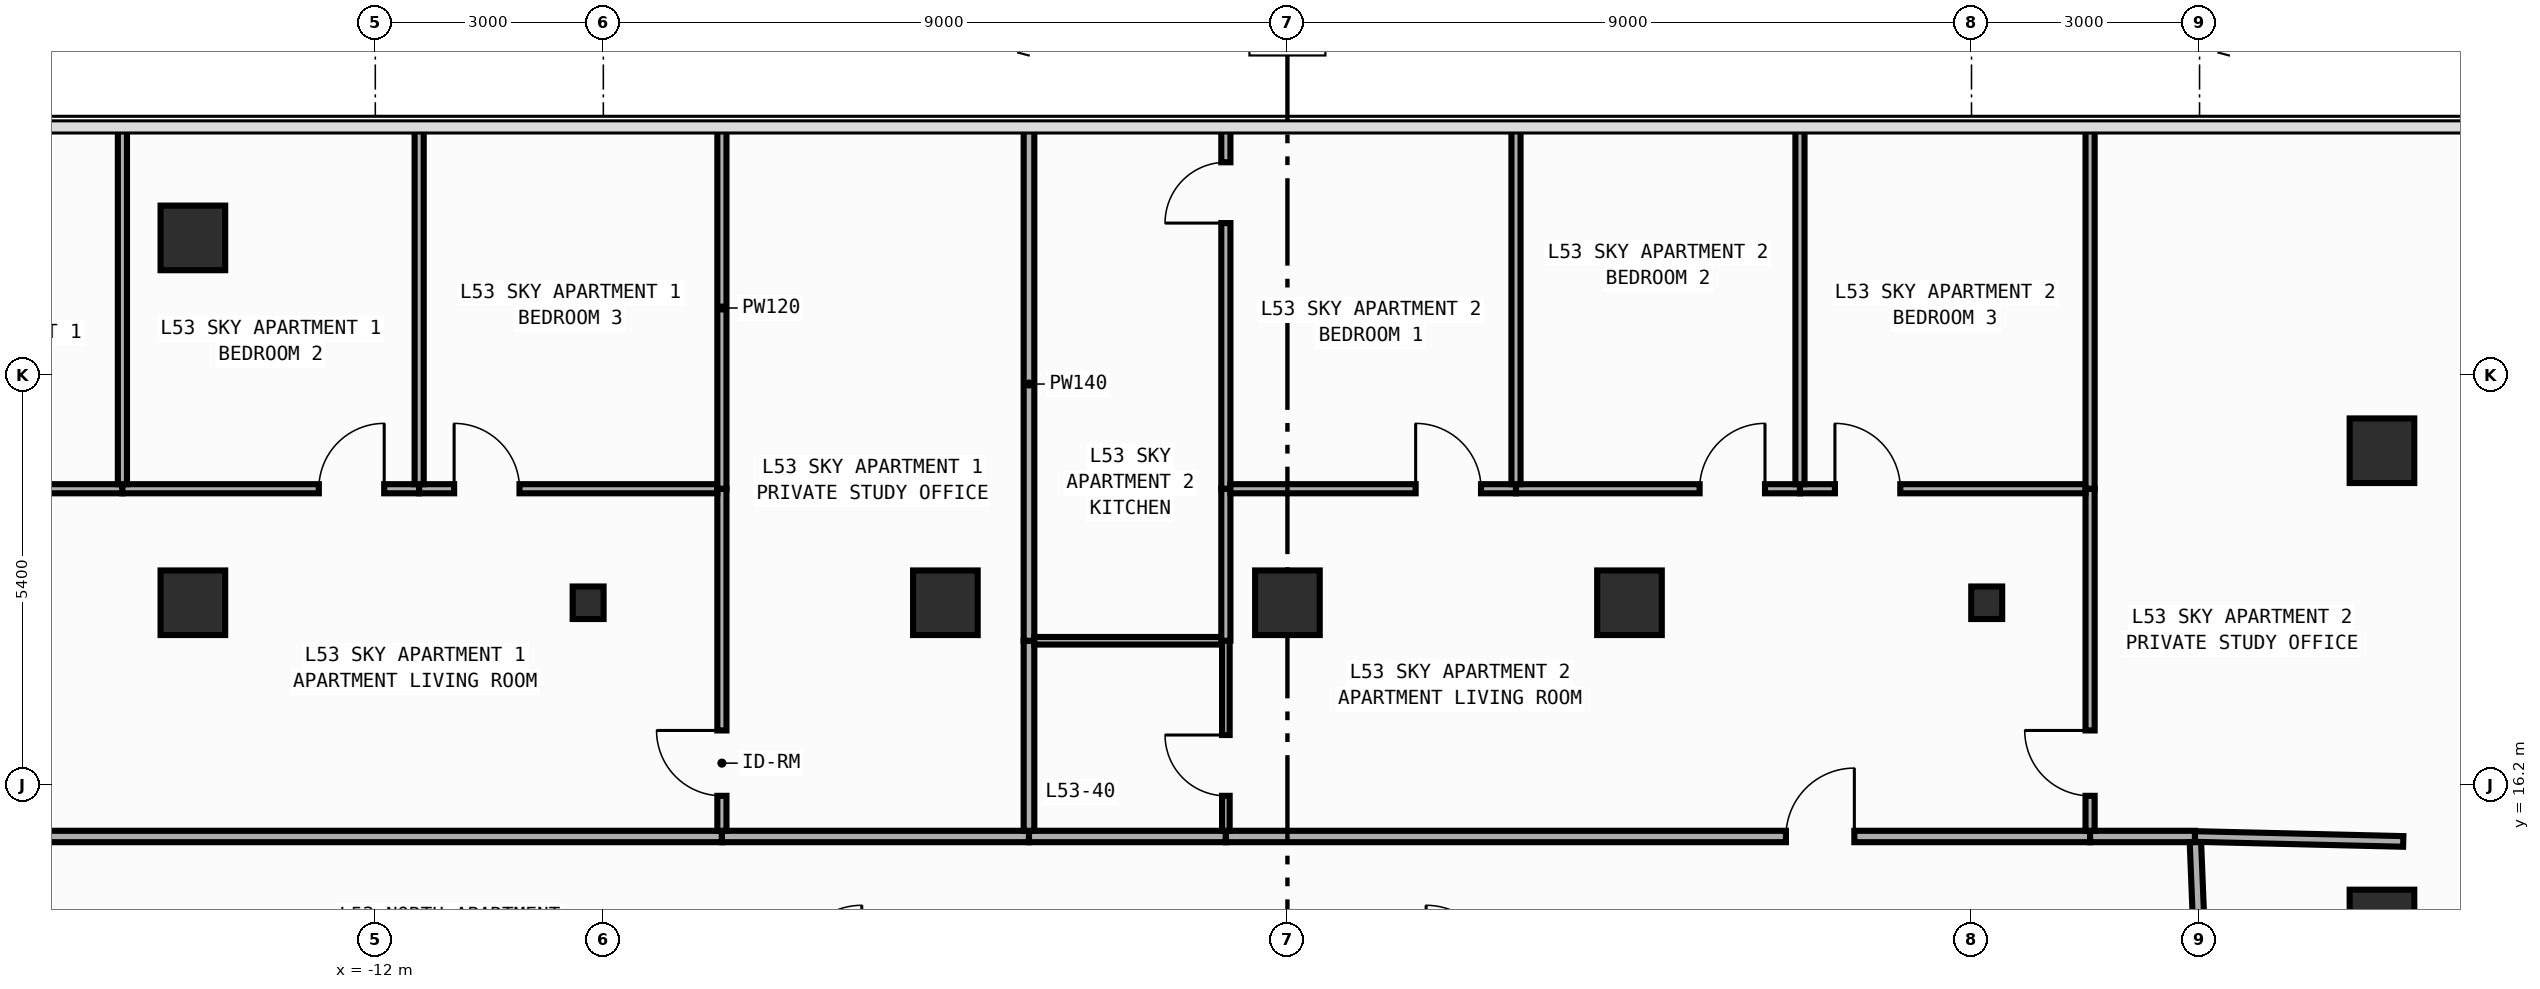
"""IFC4 building model, lengths in metres.
Left out: names, types, materials, properties, quantities, classifications, styles, units other than length and angle.
Written with IfcOpenShell. Run it as: python <this file> out.ifc"""

import sys

from ifc_helpers import new_model, si_unit, direction, frame, frame_2d, origin, origin_2d, place, context, subcontext, project, spatial, rectangle, i_section, extrude, element, fill, save


model = new_model("IFC4")
c1 = context("Model", 3, precision=1e-05, world=origin(), true_north=direction((0.0, 1.0)))
c2 = subcontext(c1, "Body", "Model", "MODEL_VIEW")
j1 = project(units=[si_unit("LENGTHUNIT", "METRE"), si_unit("PLANEANGLEUNIT", "RADIAN")], contexts=[c1])
p1 = place(None, origin())
s1 = spatial("IfcSite", under=j1, at=p1, CompositionType="ELEMENT")
p2 = place(p1, origin())
s2 = spatial("IfcBuilding", under=s1, at=p2, CompositionType="ELEMENT")
p3 = place(p2, frame((0.0, 0.0, 229.6)))
s3 = spatial("IfcBuildingStorey", under=s2, at=p3, CompositionType="ELEMENT", Elevation=229.6)
for number, where, z_axis, x_axis in (
    (1, (-9.2, 18.6, 0.0), (0.0, 0.0, 1.0), (1.0, 0.0, 0.0)),
    (2, (9.2, 18.6, 0.0), (0.0, 0.0, 1.0), (1.0, 0.0, 0.0)),
):
    element("IfcColumn", number, at=place(p3, frame(where, z_axis=z_axis, x_axis=x_axis)), inside=s3, PredefinedType="COLUMN", context=c2, shape_type="SweptSolid", body=[
        extrude(i_section(OverallWidth=0.407, OverallDepth=0.428, WebThickness=0.02, FlangeThickness=0.035, FilletRadius=0.022, at=origin_2d()), origin(), (0.0, 0.0, 1.0), 3.6),
    ])
for number, where, z_axis, x_axis in (
    (3, (-14.4, 18.6, 0.0), (0.0, 0.0, 1.0), (1.0, 0.0, 0.0)),
    (4, (14.4, 14.4, 0.0), (0.0, 0.0, 1.0), (1.0, 0.0, 0.0)),
    (5, (-4.5, 18.6, 0.0), (0.0, 0.0, 1.0), (1.0, 0.0, 0.0)),
    (6, (0.0, 18.6, 0.0), (0.0, 0.0, 1.0), (1.0, 0.0, 0.0)),
    (7, (4.5, 18.6, 0.0), (0.0, 0.0, 1.0), (1.0, 0.0, 0.0)),
    (8, (-14.4, 23.4, 0.0), (0.0, 0.0, 1.0), (1.0, 0.0, 0.0)),
    (9, (14.4, 20.6, 0.0), (0.0, 0.0, 1.0), (1.0, 0.0, 0.0)),
):
    element("IfcColumn", number, at=place(p3, frame(where, z_axis=z_axis, x_axis=x_axis)), inside=s3, PredefinedType="COLUMN", context=c2, shape_type="SweptSolid", body=[
        extrude(rectangle(XDim=0.85, YDim=0.85, at=origin_2d()), origin(), (0.0, 0.0, 1.0), 3.6),
    ])
p4 = place(p3, frame((-19.31, 15.525, 0.0), z_axis=(0.0, 0.0, 1.0), x_axis=(1.0, 0.0, 0.0)))
e10 = element("IfcWall", 10, at=p4, inside=s3, PredefinedType="PARTITIONING", context=c2, shape_type="SweptSolid", body=[
    extrude(rectangle(XDim=11.87, YDim=0.15, at=frame_2d((5.935, 0.0))), origin(), (0.0, 0.0, 1.0), 3.34),
])
p5 = place(p4, frame((1.465, 0.0, 0.0)))
e11 = element("IfcOpeningElement", 11, at=p5, cuts=e10, PredefinedType="OPENING", context=c2, shape_type="SweptSolid", body=[
    extrude(rectangle(XDim=0.9, YDim=2.15, at=frame_2d((0.45, 1.075))), frame((0.0, 0.085, 0.0), z_axis=(0.0, -1.0, 0.0), x_axis=(1.0, 0.0, 0.0)), (0.0, 0.0, 1.0), 0.17),
])
p6 = place(p3, frame((-7.44, 15.525, 0.0), z_axis=(0.0, 0.0, 1.0), x_axis=(1.0, 0.0, 0.0)))
e12 = element("IfcWall", 12, at=p6, inside=s3, PredefinedType="PARTITIONING", context=c2, shape_type="SweptSolid", body=[
    extrude(rectangle(XDim=4.04, YDim=0.15, at=frame_2d((2.02, 0.0))), origin(), (0.0, 0.0, 1.0), 3.34),
])
p7 = place(p3, frame((-3.4, 15.525, 0.0), z_axis=(0.0, 0.0, 1.0), x_axis=(1.0, 0.0, 0.0)))
e13 = element("IfcWall", 13, at=p7, inside=s3, PredefinedType="PARTITIONING", context=c2, shape_type="SweptSolid", body=[
    extrude(rectangle(XDim=2.59, YDim=0.15, at=frame_2d((1.295, 0.0))), origin(), (0.0, 0.0, 1.0), 3.34),
])
p8 = place(p3, frame((-0.81, 15.525, 0.0), z_axis=(0.0, 0.0, 1.0), x_axis=(1.0, 0.0, 0.0)))
e14 = element("IfcWall", 14, at=p8, inside=s3, PredefinedType="PARTITIONING", context=c2, shape_type="SweptSolid", body=[
    extrude(rectangle(XDim=11.37, YDim=0.15, at=frame_2d((5.685, 0.0))), origin(), (0.0, 0.0, 1.0), 3.34),
])
p9 = place(p8, frame((7.368, 0.0, 0.0)))
e15 = element("IfcOpeningElement", 15, at=p9, cuts=e14, PredefinedType="OPENING", context=c2, shape_type="SweptSolid", body=[
    extrude(rectangle(XDim=0.9, YDim=2.15, at=frame_2d((0.45, 1.075))), frame((0.0, 0.085, 0.0), z_axis=(0.0, -1.0, 0.0), x_axis=(1.0, 0.0, 0.0)), (0.0, 0.0, 1.0), 0.17),
])
p10 = place(p3, frame((10.56, 15.525, 0.0), z_axis=(0.0, 0.0, 1.0), x_axis=(1.0, 0.0, 0.0)))
e16 = element("IfcWall", 16, at=p10, inside=s3, PredefinedType="PARTITIONING", context=c2, shape_type="SweptSolid", body=[
    extrude(rectangle(XDim=1.38, YDim=0.15, at=frame_2d((0.69, 0.0))), origin(), (0.0, 0.0, 1.0), 3.34),
])
p11 = place(p3, frame((12.015, 13.72, 0.0), z_axis=(0.0, 0.0, 1.0), x_axis=(-0.040046877756, 0.99919780203, 0.0)))
e17 = element("IfcWall", 17, at=p11, inside=s3, PredefinedType="PARTITIONING", context=c2, shape_type="SweptSolid", body=[
    extrude(rectangle(XDim=1.731, YDim=0.15, at=frame_2d((0.866, 0.0))), origin(), (0.0, 0.0, 1.0), 3.34),
])
p12 = place(p3, frame((-7.44, 15.6, 0.0), z_axis=(0.0, 0.0, 1.0), x_axis=(0.0, 1.0, 0.0)))
e18 = element("IfcWall", 18, at=p12, inside=s3, PredefinedType="PARTITIONING", context=c2, shape_type="SweptSolid", body=[
    extrude(rectangle(XDim=4.5, YDim=0.12, at=frame_2d((2.25, 0.0))), origin(), (0.0, 0.0, 1.0), 3.34),
])
p13 = place(p12, frame((0.46, 0.0, 0.0)))
e19 = element("IfcOpeningElement", 19, at=p13, cuts=e18, PredefinedType="OPENING", context=c2, shape_type="SweptSolid", body=[
    extrude(rectangle(XDim=0.86, YDim=2.15, at=frame_2d((0.43, 1.075))), frame((0.0, 0.07, 0.0), z_axis=(0.0, -1.0, 0.0), x_axis=(1.0, 0.0, 0.0)), (0.0, 0.0, 1.0), 0.14),
])
p14 = place(p3, frame((-19.25, 20.1, 0.0), z_axis=(0.0, 0.0, 1.0), x_axis=(1.0, 0.0, 0.0)))
e20 = element("IfcWall", 20, at=p14, inside=s3, PredefinedType="PARTITIONING", context=c2, shape_type="SweptSolid", body=[
    extrude(rectangle(XDim=3.923, YDim=0.12, at=frame_2d((1.961, 0.0))), origin(), (0.0, 0.0, 1.0), 3.34),
])
p15 = place(p14, frame((1.317, 0.0, 0.0)))
e21 = element("IfcOpeningElement", 21, at=p15, cuts=e20, PredefinedType="OPENING", context=c2, shape_type="SweptSolid", body=[
    extrude(rectangle(XDim=0.86, YDim=2.15, at=frame_2d((0.43, 1.075))), frame((0.0, 0.07, 0.0), z_axis=(0.0, -1.0, 0.0), x_axis=(1.0, 0.0, 0.0)), (0.0, 0.0, 1.0), 0.14),
])
p16 = place(p3, frame((-15.327, 20.1, 0.0), z_axis=(0.0, 0.0, 1.0), x_axis=(1.0, 0.0, 0.0)))
e22 = element("IfcWall", 22, at=p16, inside=s3, PredefinedType="PARTITIONING", context=c2, shape_type="SweptSolid", body=[
    extrude(rectangle(XDim=3.904, YDim=0.12, at=frame_2d((1.952, 0.0))), origin(), (0.0, 0.0, 1.0), 3.34),
])
p17 = place(p16, frame((2.584, 0.0, 0.0)))
e23 = element("IfcOpeningElement", 23, at=p17, cuts=e22, PredefinedType="OPENING", context=c2, shape_type="SweptSolid", body=[
    extrude(rectangle(XDim=0.86, YDim=2.15, at=frame_2d((0.43, 1.075))), frame((0.0, 0.07, 0.0), z_axis=(0.0, -1.0, 0.0), x_axis=(1.0, 0.0, 0.0)), (0.0, 0.0, 1.0), 0.14),
])
p18 = place(p3, frame((-11.423, 20.1, 0.0), z_axis=(0.0, 0.0, 1.0), x_axis=(1.0, 0.0, 0.0)))
e24 = element("IfcWall", 24, at=p18, inside=s3, PredefinedType="PARTITIONING", context=c2, shape_type="SweptSolid", body=[
    extrude(rectangle(XDim=3.923, YDim=0.12, at=frame_2d((1.961, 0.0))), origin(), (0.0, 0.0, 1.0), 3.34),
])
p19 = place(p18, frame((0.46, 0.0, 0.0)))
e25 = element("IfcOpeningElement", 25, at=p19, cuts=e24, PredefinedType="OPENING", context=c2, shape_type="SweptSolid", body=[
    extrude(rectangle(XDim=0.86, YDim=2.15, at=frame_2d((0.43, 1.075))), frame((0.0, 0.07, 0.0), z_axis=(0.0, -1.0, 0.0), x_axis=(1.0, 0.0, 0.0)), (0.0, 0.0, 1.0), 0.14),
])
p20 = place(p3, frame((-7.44, 20.1, 0.0), z_axis=(0.0, 0.0, 1.0), x_axis=(0.0, 1.0, 0.0)))
e26 = element("IfcWall", 26, at=p20, inside=s3, PredefinedType="PARTITIONING", context=c2, shape_type="SweptSolid", body=[
    extrude(rectangle(XDim=4.755, YDim=0.12, at=frame_2d((2.377, 0.0))), origin(), (0.0, 0.0, 1.0), 3.34),
])
p21 = place(p3, frame((-3.4, 15.6, 0.0), z_axis=(0.0, 0.0, 1.0), x_axis=(0.0, 1.0, 0.0)))
e27 = element("IfcWall", 27, at=p21, inside=s3, PredefinedType="PARTITIONING", context=c2, shape_type="SweptSolid", body=[
    extrude(rectangle(XDim=2.5, YDim=0.14, at=frame_2d((1.25, 0.0))), origin(), (0.0, 0.0, 1.0), 3.34),
])
p22 = place(p3, frame((-3.4, 18.1, 0.0), z_axis=(0.0, 0.0, 1.0), x_axis=(0.0, 1.0, 0.0)))
e28 = element("IfcWall", 28, at=p22, inside=s3, PredefinedType="PARTITIONING", context=c2, shape_type="SweptSolid", body=[
    extrude(rectangle(XDim=6.755, YDim=0.14, at=frame_2d((3.377, 0.0))), origin(), (0.0, 0.0, 1.0), 3.34),
])
for number, where, z_axis, x_axis in (
    (29, (-15.327, 20.16, 0.0), (0.0, 0.0, 1.0), (0.0, 1.0, 0.0)),
    (30, (-11.423, 20.16, 0.0), (0.0, 0.0, 1.0), (0.0, 1.0, 0.0)),
):
    element("IfcWall", number, at=place(p3, frame(where, z_axis=z_axis, x_axis=x_axis)), inside=s3, PredefinedType="PARTITIONING", context=c2, shape_type="SweptSolid", body=[
        extrude(rectangle(XDim=4.695, YDim=0.12, at=frame_2d((2.348, 0.0))), origin(), (0.0, 0.0, 1.0), 3.34),
    ])
p23 = place(p3, frame((-3.33, 18.1, 0.0), z_axis=(0.0, 0.0, 1.0), x_axis=(1.0, 0.0, 0.0)))
e31 = element("IfcWall", 31, at=p23, inside=s3, PredefinedType="PARTITIONING", context=c2, shape_type="SweptSolid", body=[
    extrude(rectangle(XDim=2.47, YDim=0.1, at=frame_2d((1.235, 0.0))), origin(), (0.0, 0.0, 1.0), 3.34),
])
p24 = place(p3, frame((-0.81, 15.6, 0.0), z_axis=(0.0, 0.0, 1.0), x_axis=(0.0, 1.0, 0.0)))
e32 = element("IfcWall", 32, at=p24, inside=s3, PredefinedType="PARTITIONING", context=c2, shape_type="SweptSolid", body=[
    extrude(rectangle(XDim=2.5, YDim=0.1, at=frame_2d((1.25, 0.0))), origin(), (0.0, 0.0, 1.0), 3.34),
])
p25 = place(p24, frame((0.46, 0.0, 0.0)))
e33 = element("IfcOpeningElement", 33, at=p25, cuts=e32, PredefinedType="OPENING", context=c2, shape_type="SweptSolid", body=[
    extrude(rectangle(XDim=0.8, YDim=2.1, at=frame_2d((0.4, 1.05))), frame((0.0, 0.06, 0.0), z_axis=(0.0, -1.0, 0.0), x_axis=(1.0, 0.0, 0.0)), (0.0, 0.0, 1.0), 0.12),
])
p26 = place(p3, frame((-0.81, 18.1, 0.0), z_axis=(0.0, 0.0, 1.0), x_axis=(0.0, 1.0, 0.0)))
e34 = element("IfcWall", 34, at=p26, inside=s3, PredefinedType="PARTITIONING", context=c2, shape_type="SweptSolid", body=[
    extrude(rectangle(XDim=2.0, YDim=0.12, at=frame_2d((1.0, 0.0))), origin(), (0.0, 0.0, 1.0), 3.34),
])
p27 = place(p3, frame((-0.81, 20.1, 0.0), z_axis=(0.0, 0.0, 1.0), x_axis=(0.0, 1.0, 0.0)))
e35 = element("IfcWall", 35, at=p27, inside=s3, PredefinedType="PARTITIONING", context=c2, shape_type="SweptSolid", body=[
    extrude(rectangle(XDim=4.755, YDim=0.12, at=frame_2d((2.377, 0.0))), origin(), (0.0, 0.0, 1.0), 3.34),
])
p28 = place(p27, frame((3.495, 0.0, 0.0)))
e36 = element("IfcOpeningElement", 36, at=p28, cuts=e35, PredefinedType="OPENING", context=c2, shape_type="SweptSolid", body=[
    extrude(rectangle(XDim=0.8, YDim=2.1, at=frame_2d((0.4, 1.05))), frame((0.0, 0.07, 0.0), z_axis=(0.0, -1.0, 0.0), x_axis=(1.0, 0.0, 0.0)), (0.0, 0.0, 1.0), 0.14),
])
p29 = place(p3, frame((10.56, 15.6, 0.0), z_axis=(0.0, 0.0, 1.0), x_axis=(0.0, 1.0, 0.0)))
e37 = element("IfcWall", 37, at=p29, inside=s3, PredefinedType="PARTITIONING", context=c2, shape_type="SweptSolid", body=[
    extrude(rectangle(XDim=4.5, YDim=0.12, at=frame_2d((2.25, 0.0))), origin(), (0.0, 0.0, 1.0), 3.34),
])
p30 = place(p29, frame((0.46, 0.0, 0.0)))
e38 = element("IfcOpeningElement", 38, at=p30, cuts=e37, PredefinedType="OPENING", context=c2, shape_type="SweptSolid", body=[
    extrude(rectangle(XDim=0.86, YDim=2.15, at=frame_2d((0.43, 1.075))), frame((0.0, 0.07, 0.0), z_axis=(0.0, -1.0, 0.0), x_axis=(1.0, 0.0, 0.0)), (0.0, 0.0, 1.0), 0.14),
])
p31 = place(p3, frame((-0.75, 20.1, 0.0), z_axis=(0.0, 0.0, 1.0), x_axis=(1.0, 0.0, 0.0)))
e39 = element("IfcWall", 39, at=p31, inside=s3, PredefinedType="PARTITIONING", context=c2, shape_type="SweptSolid", body=[
    extrude(rectangle(XDim=3.757, YDim=0.12, at=frame_2d((1.878, 0.0))), origin(), (0.0, 0.0, 1.0), 3.34),
])
p32 = place(p31, frame((2.437, 0.0, 0.0)))
e40 = element("IfcOpeningElement", 40, at=p32, cuts=e39, PredefinedType="OPENING", context=c2, shape_type="SweptSolid", body=[
    extrude(rectangle(XDim=0.86, YDim=2.15, at=frame_2d((0.43, 1.075))), frame((0.0, 0.07, 0.0), z_axis=(0.0, -1.0, 0.0), x_axis=(1.0, 0.0, 0.0)), (0.0, 0.0, 1.0), 0.14),
])
p33 = place(p3, frame((3.007, 20.1, 0.0), z_axis=(0.0, 0.0, 1.0), x_axis=(1.0, 0.0, 0.0)))
e41 = element("IfcWall", 41, at=p33, inside=s3, PredefinedType="PARTITIONING", context=c2, shape_type="SweptSolid", body=[
    extrude(rectangle(XDim=3.736, YDim=0.12, at=frame_2d((1.868, 0.0))), origin(), (0.0, 0.0, 1.0), 3.34),
])
p34 = place(p33, frame((2.416, 0.0, 0.0)))
e42 = element("IfcOpeningElement", 42, at=p34, cuts=e41, PredefinedType="OPENING", context=c2, shape_type="SweptSolid", body=[
    extrude(rectangle(XDim=0.86, YDim=2.15, at=frame_2d((0.43, 1.075))), frame((0.0, 0.07, 0.0), z_axis=(0.0, -1.0, 0.0), x_axis=(1.0, 0.0, 0.0)), (0.0, 0.0, 1.0), 0.14),
])
p35 = place(p3, frame((6.743, 20.1, 0.0), z_axis=(0.0, 0.0, 1.0), x_axis=(1.0, 0.0, 0.0)))
e43 = element("IfcWall", 43, at=p35, inside=s3, PredefinedType="PARTITIONING", context=c2, shape_type="SweptSolid", body=[
    extrude(rectangle(XDim=3.757, YDim=0.12, at=frame_2d((1.878, 0.0))), origin(), (0.0, 0.0, 1.0), 3.34),
])
p36 = place(p35, frame((0.46, 0.0, 0.0)))
e44 = element("IfcOpeningElement", 44, at=p36, cuts=e43, PredefinedType="OPENING", context=c2, shape_type="SweptSolid", body=[
    extrude(rectangle(XDim=0.86, YDim=2.15, at=frame_2d((0.43, 1.075))), frame((0.0, 0.07, 0.0), z_axis=(0.0, -1.0, 0.0), x_axis=(1.0, 0.0, 0.0)), (0.0, 0.0, 1.0), 0.14),
])
p37 = place(p3, frame((10.56, 20.1, 0.0), z_axis=(0.0, 0.0, 1.0), x_axis=(0.0, 1.0, 0.0)))
e45 = element("IfcWall", 45, at=p37, inside=s3, PredefinedType="PARTITIONING", context=c2, shape_type="SweptSolid", body=[
    extrude(rectangle(XDim=4.755, YDim=0.12, at=frame_2d((2.377, 0.0))), origin(), (0.0, 0.0, 1.0), 3.34),
])
p38 = place(p3, frame((11.94, 15.525, 0.0), z_axis=(0.0, 0.0, 1.0), x_axis=(0.999719241816, -0.023694673289, 0.0)))
e46 = element("IfcWall", 46, at=p38, inside=s3, PredefinedType="PARTITIONING", context=c2, shape_type="SweptSolid", body=[
    extrude(rectangle(XDim=2.741, YDim=0.14, at=frame_2d((1.37, 0.0))), origin(), (0.0, 0.0, 1.0), 3.34),
])
for number, where, z_axis, x_axis in (
    (47, (3.007, 20.16, 0.0), (0.0, 0.0, 1.0), (0.0, 1.0, 0.0)),
    (48, (6.743, 20.16, 0.0), (0.0, 0.0, 1.0), (0.0, 1.0, 0.0)),
):
    element("IfcWall", number, at=place(p3, frame(where, z_axis=z_axis, x_axis=x_axis)), inside=s3, PredefinedType="PARTITIONING", context=c2, shape_type="SweptSolid", body=[
        extrude(rectangle(XDim=4.695, YDim=0.12, at=frame_2d((2.348, 0.0))), origin(), (0.0, 0.0, 1.0), 3.34),
    ])
p39 = place(p9, origin())
e49 = element("IfcDoor", 49, at=p39, inside=s3, OperationType="SINGLE_SWING_RIGHT", PredefinedType="DOOR", context=c2, shape_type="SweptSolid", body=[
    extrude(rectangle(XDim=0.9, YDim=2.15, at=frame_2d((0.45, 1.075))), frame((0.0, 0.025, 0.0), z_axis=(0.0, -1.0, 0.0), x_axis=(1.0, 0.0, 0.0)), (0.0, 0.0, 1.0), 0.05),
])
fill(e15, e49)
p40 = place(p13, origin())
e50 = element("IfcDoor", 50, at=p40, inside=s3, OperationType="SINGLE_SWING_RIGHT", PredefinedType="DOOR", context=c2, shape_type="SweptSolid", body=[
    extrude(rectangle(XDim=0.86, YDim=2.15, at=frame_2d((0.43, 1.075))), frame((0.0, 0.025, 0.0), z_axis=(0.0, -1.0, 0.0), x_axis=(1.0, 0.0, 0.0)), (0.0, 0.0, 1.0), 0.05),
])
fill(e19, e50)
p41 = place(p17, origin())
e51 = element("IfcDoor", 51, at=p41, inside=s3, OperationType="SINGLE_SWING_RIGHT", PredefinedType="DOOR", context=c2, shape_type="SweptSolid", body=[
    extrude(rectangle(XDim=0.86, YDim=2.15, at=frame_2d((0.43, 1.075))), frame((0.0, 0.025, 0.0), z_axis=(0.0, -1.0, 0.0), x_axis=(1.0, 0.0, 0.0)), (0.0, 0.0, 1.0), 0.05),
])
fill(e23, e51)
p42 = place(p19, origin())
e52 = element("IfcDoor", 52, at=p42, inside=s3, OperationType="SINGLE_SWING_LEFT", PredefinedType="DOOR", context=c2, shape_type="SweptSolid", body=[
    extrude(rectangle(XDim=0.86, YDim=2.15, at=frame_2d((0.43, 1.075))), frame((0.0, 0.025, 0.0), z_axis=(0.0, -1.0, 0.0), x_axis=(1.0, 0.0, 0.0)), (0.0, 0.0, 1.0), 0.05),
])
fill(e25, e52)
p43 = place(p25, origin())
e53 = element("IfcDoor", 53, at=p43, inside=s3, OperationType="SINGLE_SWING_RIGHT", PredefinedType="DOOR", context=c2, shape_type="SweptSolid", body=[
    extrude(rectangle(XDim=0.8, YDim=2.1, at=frame_2d((0.4, 1.05))), frame((0.0, 0.025, 0.0), z_axis=(0.0, -1.0, 0.0), x_axis=(1.0, 0.0, 0.0)), (0.0, 0.0, 1.0), 0.05),
])
fill(e33, e53)
p44 = place(p30, origin())
e54 = element("IfcDoor", 54, at=p44, inside=s3, OperationType="SINGLE_SWING_RIGHT", PredefinedType="DOOR", context=c2, shape_type="SweptSolid", body=[
    extrude(rectangle(XDim=0.86, YDim=2.15, at=frame_2d((0.43, 1.075))), frame((0.0, 0.025, 0.0), z_axis=(0.0, -1.0, 0.0), x_axis=(1.0, 0.0, 0.0)), (0.0, 0.0, 1.0), 0.05),
])
fill(e38, e54)
p45 = place(p32, origin())
e55 = element("IfcDoor", 55, at=p45, inside=s3, OperationType="SINGLE_SWING_LEFT", PredefinedType="DOOR", context=c2, shape_type="SweptSolid", body=[
    extrude(rectangle(XDim=0.86, YDim=2.15, at=frame_2d((0.43, 1.075))), frame((0.0, 0.025, 0.0), z_axis=(0.0, -1.0, 0.0), x_axis=(1.0, 0.0, 0.0)), (0.0, 0.0, 1.0), 0.05),
])
fill(e40, e55)
p46 = place(p34, origin())
e56 = element("IfcDoor", 56, at=p46, inside=s3, OperationType="SINGLE_SWING_RIGHT", PredefinedType="DOOR", context=c2, shape_type="SweptSolid", body=[
    extrude(rectangle(XDim=0.86, YDim=2.15, at=frame_2d((0.43, 1.075))), frame((0.0, 0.025, 0.0), z_axis=(0.0, -1.0, 0.0), x_axis=(1.0, 0.0, 0.0)), (0.0, 0.0, 1.0), 0.05),
])
fill(e42, e56)
p47 = place(p36, origin())
e57 = element("IfcDoor", 57, at=p47, inside=s3, OperationType="SINGLE_SWING_LEFT", PredefinedType="DOOR", context=c2, shape_type="SweptSolid", body=[
    extrude(rectangle(XDim=0.86, YDim=2.15, at=frame_2d((0.43, 1.075))), frame((0.0, 0.025, 0.0), z_axis=(0.0, -1.0, 0.0), x_axis=(1.0, 0.0, 0.0)), (0.0, 0.0, 1.0), 0.05),
])
fill(e44, e57)
p48 = place(p28, origin())
e58 = element("IfcDoor", 58, at=p48, inside=s3, OperationType="SINGLE_SWING_LEFT", PredefinedType="DOOR", context=c2, shape_type="SweptSolid", body=[
    extrude(rectangle(XDim=0.8, YDim=2.1, at=frame_2d((0.4, 1.05))), frame((0.0, 0.025, 0.0), z_axis=(0.0, -1.0, 0.0), x_axis=(1.0, 0.0, 0.0)), (0.0, 0.0, 1.0), 0.05),
])
fill(e36, e58)
save(model, sys.argv[1])
